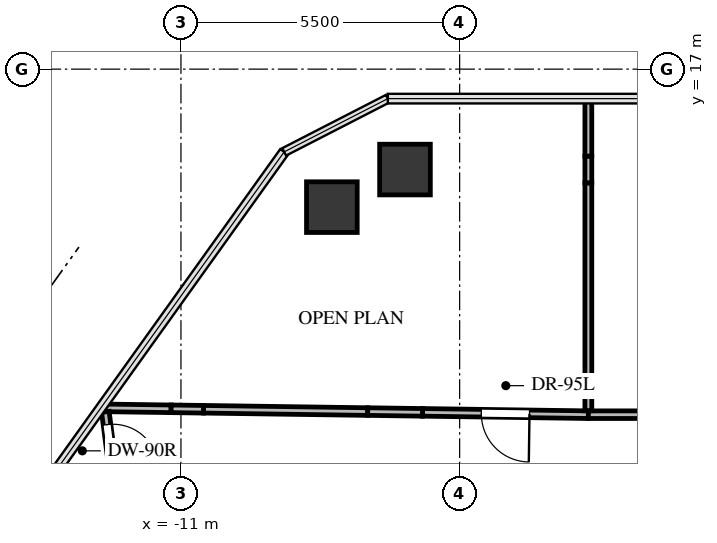
"""IFC4 building model, lengths in metres.
Left out: names, types, materials, properties, quantities, classifications, styles, units other than length and angle.
Written with IfcOpenShell. Run it as: python <this file> out.ifc"""

import sys

from ifc_helpers import new_model, si_unit, direction, frame, frame_2d, origin, origin_2d, place, context, subcontext, project, spatial, rectangle, extrude, source, transform, mapped, element, fill, save


model = new_model("IFC4")
c1 = context("Model", 3, precision=1e-05, world=origin(), true_north=direction((0.0, 1.0)))
c2 = subcontext(c1, "Body", "Model", "MODEL_VIEW")
j1 = project(units=[si_unit("LENGTHUNIT", "METRE"), si_unit("PLANEANGLEUNIT", "RADIAN")], contexts=[c1])
p1 = place(None, origin())
s1 = spatial("IfcSite", under=j1, at=p1, CompositionType="ELEMENT")
p2 = place(p1, origin())
s2 = spatial("IfcBuilding", under=s1, at=p2, CompositionType="ELEMENT")
p3 = place(p2, frame((0.0, 0.0, 203.2)))
s3 = spatial("IfcBuildingStorey", under=s2, at=p3, CompositionType="ELEMENT", Elevation=203.2)
m1 = source(origin(), c2, "Body", "SweptSolid", [
    extrude(rectangle(XDim=1.0, YDim=1.0, at=origin_2d()), origin(), (0.0, 0.0, 1.0), 3.0),
])
for number, where, z_axis, x_axis in (
    (1, (-8.022, 14.276, -0.24), (0.0, 0.0, 1.0), (1.0, 0.0, 0.0)),
    (2, (-6.579, 15.018, -0.24), (0.0, 0.0, 1.0), (1.0, 0.0, 0.0)),
):
    element("IfcColumn", number, at=place(p3, frame(where, z_axis=z_axis, x_axis=x_axis)), inside=s3, PredefinedType="COLUMN", context=c2, shape_type="MappedRepresentation", body=[
        mapped(m1, transform((0.0, 0.0, 0.0), x_axis=(1.0, 0.0, 0.0), y_axis=(0.0, 1.0, 0.0), z_axis=(0.0, 0.0, 1.0), scale=1.0)),
    ])
p4 = place(p3, frame((-2.96, 10.18, 0.0), z_axis=(0.0, 0.0, 1.0), x_axis=(-0.999900650504, 0.014095712907, 0.0)))
e3 = element("IfcWall", 3, at=p4, inside=s3, PredefinedType="PARTITIONING", context=c2, shape_type="SweptSolid", body=[
    extrude(rectangle(XDim=3.273, YDim=0.15, at=frame_2d((1.637, 0.0))), origin(), (0.0, 0.0, 1.0), 2.308),
])
p5 = place(p4, frame((1.162, 0.0, 0.0)))
e4 = element("IfcOpeningElement", 4, at=p5, cuts=e3, PredefinedType="OPENING", context=c2, shape_type="SweptSolid", body=[
    extrude(rectangle(XDim=0.95, YDim=2.1, at=frame_2d((0.475, 1.05))), frame((0.0, 0.085, 0.0), z_axis=(0.0, -1.0, 0.0), x_axis=(1.0, 0.0, 0.0)), (0.0, 0.0, 1.0), 0.17),
])
p6 = place(p3, frame((-7.315, 10.241, 0.0), z_axis=(0.0, 0.0, 1.0), x_axis=(-0.99990075336, 0.014088414774, 0.0)))
e5 = element("IfcWall", 5, at=p6, inside=s3, PredefinedType="PARTITIONING", context=c2, shape_type="SweptSolid", body=[
    extrude(rectangle(XDim=3.24, YDim=0.15, at=frame_2d((1.62, 0.0))), origin(), (0.0, 0.0, 1.0), 2.745),
])
p7 = place(p3, frame((-11.194, 10.296, 0.0), z_axis=(0.0, 0.0, 1.0), x_axis=(-0.999900583231, 0.014100484163, 0.0)))
e6 = element("IfcWall", 6, at=p7, inside=s3, PredefinedType="PARTITIONING", context=c2, shape_type="SweptSolid", body=[
    extrude(rectangle(XDim=1.385, YDim=0.15, at=frame_2d((0.693, 0.0))), origin(), (0.0, 0.0, 1.0), 2.745),
])
p8 = place(p3, frame((-6.233, 10.226, 0.0), z_axis=(0.0, 0.0, 1.0), x_axis=(-0.999898893801, 0.014219781108, 0.0)))
e7 = element("IfcWall", 7, at=p8, inside=s3, PredefinedType="PARTITIONING", context=c2, shape_type="SweptSolid", body=[
    extrude(rectangle(XDim=1.082, YDim=0.15, at=frame_2d((0.541, 0.0))), origin(), (0.0, 0.0, 1.0), 1.942),
])
p9 = place(p3, frame((-10.555, 10.287, 0.0), z_axis=(0.0, 0.0, 1.0), x_axis=(-0.999900221389, 0.014126119966, 0.0)))
e8 = element("IfcWall", 8, at=p9, inside=s3, PredefinedType="PARTITIONING", context=c2, shape_type="SweptSolid", body=[
    extrude(rectangle(XDim=0.639, YDim=0.15, at=frame_2d((0.32, 0.0))), origin(), (0.0, 0.0, 1.0), 2.099),
])
p10 = place(p3, frame((-1.089, 10.18, 0.0), z_axis=(0.0, 0.0, 1.0), x_axis=(-1.0, 0.0, 0.0)))
e9 = element("IfcWall", 9, at=p10, inside=s3, PredefinedType="PARTITIONING", context=c2, shape_type="SweptSolid", body=[
    extrude(rectangle(XDim=1.871, YDim=0.15, at=frame_2d((0.936, 0.0))), origin(), (0.0, 0.0, 1.0), 2.745),
])
p11 = place(p3, frame((-12.492, 10.235, 0.0), z_axis=(0.0, 0.0, 1.0), x_axis=(0.129435611613, -0.991587828912, 0.0)))
e10 = element("IfcWall", 10, at=p11, inside=s3, PredefinedType="PARTITIONING", context=c2, shape_type="SweptSolid", body=[
    extrude(rectangle(XDim=1.407, YDim=0.15, at=frame_2d((0.704, 0.0))), origin(), (0.0, 0.0, 1.0), 2.745),
])
p12 = place(p11, frame((0.254, 0.0, 0.0)))
e11 = element("IfcOpeningElement", 11, at=p12, cuts=e10, PredefinedType="OPENING", context=c2, shape_type="SweptSolid", body=[
    extrude(rectangle(XDim=0.9, YDim=2.05, at=frame_2d((0.45, 1.025))), frame((0.0, 0.085, 0.0), z_axis=(0.0, -1.0, 0.0), x_axis=(1.0, 0.0, 0.0)), (0.0, 0.0, 1.0), 0.17),
])
p13 = place(p3, frame((-2.96, 16.418, 0.0), z_axis=(0.0, 0.0, 1.0), x_axis=(0.0, -1.0, 0.0)))
e12 = element("IfcWall", 12, at=p13, inside=s3, PredefinedType="PARTITIONING", context=c2, shape_type="SweptSolid", body=[
    extrude(rectangle(XDim=1.137, YDim=0.135, at=frame_2d((0.569, 0.0))), origin(), (0.0, 0.0, 1.0), 2.745),
])
p14 = place(p3, frame((-2.96, 14.755, 0.0), z_axis=(0.0, 0.0, 1.0), x_axis=(0.0, -1.0, 0.0)))
e13 = element("IfcWall", 13, at=p14, inside=s3, PredefinedType="PARTITIONING", context=c2, shape_type="SweptSolid", body=[
    extrude(rectangle(XDim=4.496, YDim=0.135, at=frame_2d((2.248, 0.0))), origin(), (0.0, 0.0, 1.0), 2.745),
])
p15 = place(p3, frame((-2.96, 15.281, 0.0), z_axis=(0.0, 0.0, 1.0), x_axis=(0.0, -1.0, 0.0)))
e14 = element("IfcWall", 14, at=p15, inside=s3, PredefinedType="PARTITIONING", context=c2, shape_type="SweptSolid", body=[
    extrude(rectangle(XDim=0.525, YDim=0.135, at=frame_2d((0.263, 0.0))), origin(), (0.0, 0.0, 1.0), 2.099),
])
m2 = source(origin(), c2, "Body", "SweptSolid", [
    extrude(rectangle(XDim=0.95, YDim=2.1, at=frame_2d((0.475, 1.05))), frame((0.0, 0.025, 0.0), z_axis=(0.0, -1.0, 0.0), x_axis=(1.0, 0.0, 0.0)), (0.0, 0.0, 1.0), 0.05),
])
p16 = place(p5, origin())
e15 = element("IfcDoor", 15, at=p16, inside=s3, OperationType="SINGLE_SWING_LEFT", PredefinedType="DOOR", context=c2, shape_type="MappedRepresentation", body=[
    mapped(m2, transform((0.0, 0.0, 0.0), x_axis=(1.0, 0.0, 0.0), y_axis=(0.0, 1.0, 0.0), z_axis=(0.0, 0.0, 1.0), scale=1.0)),
])
fill(e4, e15)
m3 = source(origin(), c2, "Body", "SweptSolid", [
    extrude(rectangle(XDim=0.9, YDim=2.05, at=frame_2d((0.45, 1.025))), frame((0.0, 0.025, 0.0), z_axis=(0.0, -1.0, 0.0), x_axis=(1.0, 0.0, 0.0)), (0.0, 0.0, 1.0), 0.05),
])
p17 = place(p12, origin())
e16 = element("IfcDoor", 16, at=p17, inside=s3, OperationType="SINGLE_SWING_RIGHT", PredefinedType="DOOR", context=c2, shape_type="MappedRepresentation", body=[
    mapped(m3, transform((0.0, 0.0, 0.0), x_axis=(1.0, 0.0, 0.0), y_axis=(0.0, 1.0, 0.0), z_axis=(0.0, 0.0, 1.0), scale=1.0)),
])
fill(e11, e16)
save(model, sys.argv[1])
